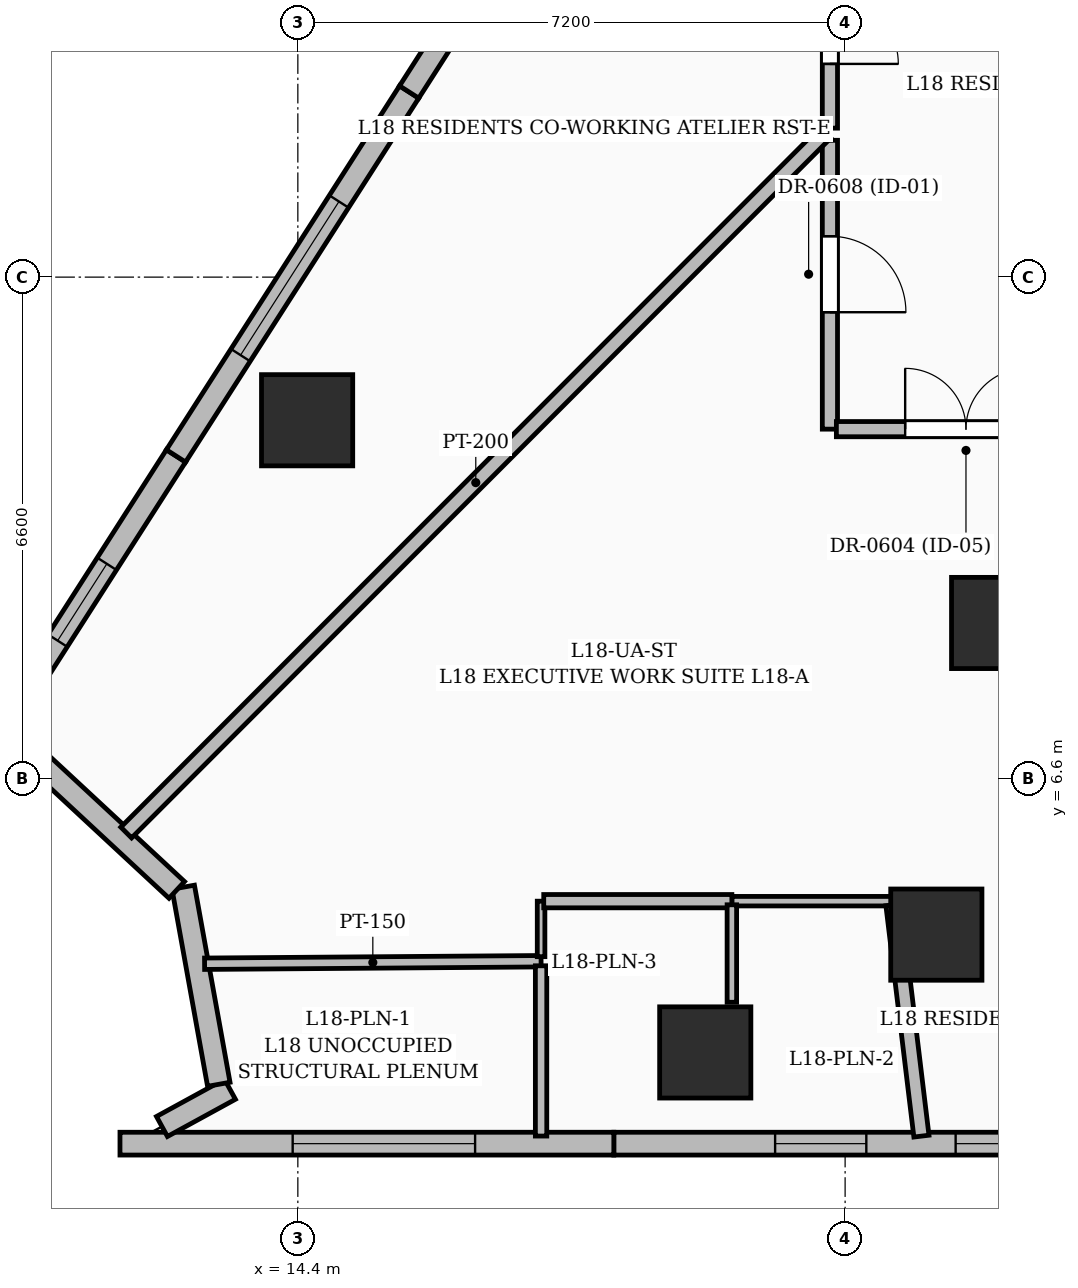
"""IFC4 building model, lengths in metres.
Left out: names, types, materials, properties, quantities, classifications, styles, units other than length and angle.
Written with IfcOpenShell. Run it as: python <this file> out.ifc"""

import sys

from ifc_helpers import new_model, si_unit, direction, frame, frame_2d, origin, origin_2d, place, context, subcontext, project, spatial, rectangle, extrude, element, fill, save


model = new_model("IFC4")
c1 = context("Model", 3, precision=1e-05, world=origin(), true_north=direction((0.0, 1.0)))
c2 = subcontext(c1, "Body", "Model", "MODEL_VIEW")
j1 = project(units=[si_unit("LENGTHUNIT", "METRE"), si_unit("PLANEANGLEUNIT", "RADIAN")], contexts=[c1])
p1 = place(None, origin())
s1 = spatial("IfcSite", under=j1, at=p1, CompositionType="ELEMENT")
p2 = place(p1, origin())
s2 = spatial("IfcBuilding", under=s1, at=p2, CompositionType="ELEMENT")
p3 = place(p2, frame((0.0, 0.0, 75.0)))
s3 = spatial("IfcBuildingStorey", under=s2, at=p3, CompositionType="ELEMENT", Elevation=75.0)
for number, where, z_axis, x_axis in (
    (1, (22.8, 4.55, 0.0), (0.0, 0.0, 1.0), (1.0, 0.0, 0.0)),
    (2, (23.6, 8.65, 0.0), (0.0, 0.0, 1.0), (1.0, 0.0, 0.0)),
    (3, (19.76, 3.0, 0.0), (0.0, 0.0, 1.0), (1.0, 0.0, 0.0)),
    (4, (14.522, 11.317, 0.0), (0.0, 0.0, 1.0), (1.0, 0.0, 0.0)),
):
    element("IfcColumn", number, at=place(p3, frame(where, z_axis=z_axis, x_axis=x_axis)), inside=s3, PredefinedType="COLUMN", context=c2, shape_type="SweptSolid", body=[
        extrude(rectangle(XDim=1.2, YDim=1.2, at=origin_2d()), origin(), (0.0, 0.0, 1.0), 3.6),
    ])
p4 = place(p3, frame((25.054, 1.8, 0.0), z_axis=(0.0, 0.0, 1.0), x_axis=(-1.0, 0.0, 0.0)))
e5 = element("IfcWall", 5, at=p4, inside=s3, PredefinedType="SOLIDWALL", context=c2, shape_type="SweptSolid", body=[
    extrude(rectangle(XDim=6.497, YDim=0.3, at=frame_2d((3.249, 0.0))), origin(), (0.0, 0.0, 1.0), 3.35),
])
p5 = place(p4, frame((3.175, 0.0, 0.8)))
e6 = element("IfcOpeningElement", 6, at=p5, cuts=e5, PredefinedType="OPENING", context=c2, shape_type="SweptSolid", body=[
    extrude(rectangle(XDim=1.2, YDim=1.8, at=frame_2d((0.6, 0.9))), frame((0.0, 0.16, 0.0), z_axis=(0.0, -1.0, 0.0), x_axis=(1.0, 0.0, 0.0)), (0.0, 0.0, 1.0), 0.32),
])
p6 = place(p4, frame((0.8, 0.0, 0.8)))
e7 = element("IfcOpeningElement", 7, at=p6, cuts=e5, PredefinedType="OPENING", context=c2, shape_type="SweptSolid", body=[
    extrude(rectangle(XDim=1.2, YDim=1.8, at=frame_2d((0.6, 0.9))), frame((0.0, 0.16, 0.0), z_axis=(0.0, -1.0, 0.0), x_axis=(1.0, 0.0, 0.0)), (0.0, 0.0, 1.0), 0.32),
])
p7 = place(p3, frame((18.557, 1.8, 0.0), z_axis=(0.0, 0.0, 1.0), x_axis=(-1.0, 0.0, 0.0)))
e8 = element("IfcWall", 8, at=p7, inside=s3, PredefinedType="SOLIDWALL", context=c2, shape_type="SweptSolid", body=[
    extrude(rectangle(XDim=6.497, YDim=0.3, at=frame_2d((3.249, 0.0))), origin(), (0.0, 0.0, 1.0), 3.35),
])
p8 = place(p7, frame((1.825, 0.0, 0.6)))
e9 = element("IfcOpeningElement", 9, at=p8, cuts=e8, PredefinedType="OPENING", context=c2, shape_type="SweptSolid", body=[
    extrude(rectangle(XDim=2.4, YDim=2.1, at=frame_2d((1.2, 1.05))), frame((0.0, 0.16, 0.0), z_axis=(0.0, -1.0, 0.0), x_axis=(1.0, 0.0, 0.0)), (0.0, 0.0, 1.0), 0.32),
])
p9 = place(p3, frame((12.612, 2.026, 0.0), z_axis=(0.0, 0.0, 1.0), x_axis=(0.877245120991, 0.480042704036, 0.0)))
e10 = element("IfcWall", 10, at=p9, inside=s3, PredefinedType="SOLIDWALL", context=c2, shape_type="SweptSolid", body=[
    extrude(rectangle(XDim=1.02, YDim=0.3, at=frame_2d((0.51, 0.0))), origin(), (0.0, 0.0, 1.0), 3.35),
])
p10 = place(p3, frame((13.36, 2.581, 0.0), z_axis=(0.0, 0.0, 1.0), x_axis=(-0.177621463404, 0.984098885142, 0.0)))
e11 = element("IfcWall", 11, at=p10, inside=s3, PredefinedType="SOLIDWALL", context=c2, shape_type="SweptSolid", body=[
    extrude(rectangle(XDim=2.635, YDim=0.3, at=frame_2d((1.317, 0.0))), origin(), (0.0, 0.0, 1.0), 3.35),
])
p11 = place(p3, frame((12.807, 5.138, 0.0), z_axis=(0.0, 0.0, 1.0), x_axis=(-0.732670686937, 0.680583326642, 0.0)))
e12 = element("IfcWall", 12, at=p11, inside=s3, PredefinedType="SOLIDWALL", context=c2, shape_type="SweptSolid", body=[
    extrude(rectangle(XDim=2.62, YDim=0.3, at=frame_2d((1.31, 0.0))), origin(), (0.0, 0.0, 1.0), 3.35),
])
p12 = place(p3, frame((10.061, 6.578, 0.0), z_axis=(0.0, 0.0, 1.0), x_axis=(0.539464859434, 0.842008114828, 0.0)))
e13 = element("IfcWall", 13, at=p12, inside=s3, PredefinedType="SOLIDWALL", context=c2, shape_type="SweptSolid", body=[
    extrude(rectangle(XDim=5.071, YDim=0.3, at=frame_2d((2.536, 0.0))), origin(), (0.0, 0.0, 1.0), 3.35),
])
p13 = place(p12, frame((2.185, 0.0, 0.8)))
e14 = element("IfcOpeningElement", 14, at=p13, cuts=e13, PredefinedType="OPENING", context=c2, shape_type="SweptSolid", body=[
    extrude(rectangle(XDim=1.2, YDim=1.8, at=frame_2d((0.6, 0.9))), frame((0.0, 0.16, 0.0), z_axis=(0.0, -1.0, 0.0), x_axis=(1.0, 0.0, 0.0)), (0.0, 0.0, 1.0), 0.32),
])
p14 = place(p3, frame((12.797, 10.848, 0.0), z_axis=(0.0, 0.0, 1.0), x_axis=(0.539467898562, 0.842006167686, 0.0)))
e15 = element("IfcWall", 15, at=p14, inside=s3, PredefinedType="SOLIDWALL", context=c2, shape_type="SweptSolid", body=[
    extrude(rectangle(XDim=5.686, YDim=0.3, at=frame_2d((2.843, 0.0))), origin(), (0.0, 0.0, 1.0), 3.35),
])
p15 = place(p14, frame((1.575, 0.0, 0.6)))
e16 = element("IfcOpeningElement", 16, at=p15, cuts=e15, PredefinedType="OPENING", context=c2, shape_type="SweptSolid", body=[
    extrude(rectangle(XDim=2.4, YDim=2.1, at=frame_2d((1.2, 1.05))), frame((0.0, 0.16, 0.0), z_axis=(0.0, -1.0, 0.0), x_axis=(1.0, 0.0, 0.0)), (0.0, 0.0, 1.0), 0.32),
])
p16 = place(p3, frame((15.864, 15.635, 0.0), z_axis=(0.0, 0.0, 1.0), x_axis=(0.53944798429, 0.842018926299, 0.0)))
e17 = element("IfcWall", 17, at=p16, inside=s3, PredefinedType="SOLIDWALL", context=c2, shape_type="SweptSolid", body=[
    extrude(rectangle(XDim=5.411, YDim=0.3, at=frame_2d((2.706, 0.0))), origin(), (0.0, 0.0, 1.0), 3.35),
])
p17 = place(p16, frame((1.725, 0.0, 0.55)))
e18 = element("IfcOpeningElement", 18, at=p17, cuts=e17, PredefinedType="OPENING", context=c2, shape_type="SweptSolid", body=[
    extrude(rectangle(XDim=2.1, YDim=2.4, at=frame_2d((1.05, 1.2))), frame((0.0, 0.16, 0.0), z_axis=(0.0, -1.0, 0.0), x_axis=(1.0, 0.0, 0.0)), (0.0, 0.0, 1.0), 0.32),
])
p18 = place(p3, frame((21.4, 15.0, 0.0), z_axis=(0.0, 0.0, 1.0), x_axis=(0.0, -1.0, 0.0)))
e19 = element("IfcWall", 19, at=p18, inside=s3, PredefinedType="PARTITIONING", context=c2, shape_type="SweptSolid", body=[
    extrude(rectangle(XDim=3.8, YDim=0.2, at=frame_2d((1.9, 0.0))), origin(), (0.0, 0.0, 1.0), 2.911),
])
p19 = place(p18, frame((1.262, 0.0, 0.0)))
e20 = element("IfcOpeningElement", 20, at=p19, cuts=e19, PredefinedType="OPENING", context=c2, shape_type="SweptSolid", body=[
    extrude(rectangle(XDim=1.0, YDim=2.2, at=frame_2d((0.5, 1.1))), frame((0.0, 0.11, 0.0), z_axis=(0.0, -1.0, 0.0), x_axis=(1.0, 0.0, 0.0)), (0.0, 0.0, 1.0), 0.22),
])
p20 = place(p3, frame((21.485, 11.2, 0.0), z_axis=(0.0, 0.0, 1.0), x_axis=(1.0, 0.0, 0.0)))
e21 = element("IfcWall", 21, at=p20, inside=s3, PredefinedType="PARTITIONING", context=c2, shape_type="SweptSolid", body=[
    extrude(rectangle(XDim=3.384, YDim=0.2, at=frame_2d((1.692, 0.0))), origin(), (0.0, 0.0, 1.0), 3.35),
])
p21 = place(p20, frame((0.905, 0.0, 0.0)))
e22 = element("IfcOpeningElement", 22, at=p21, cuts=e21, PredefinedType="OPENING", context=c2, shape_type="SweptSolid", body=[
    extrude(rectangle(XDim=1.6, YDim=2.3, at=frame_2d((0.8, 1.15))), frame((0.0, 0.11, 0.0), z_axis=(0.0, -1.0, 0.0), x_axis=(1.0, 0.0, 0.0)), (0.0, 0.0, 1.0), 0.22),
])
p22 = place(p3, frame((21.4, 17.75, 0.0), z_axis=(0.0, 0.0, 1.0), x_axis=(0.0, -1.0, 0.0)))
e23 = element("IfcWall", 23, at=p22, inside=s3, PredefinedType="PARTITIONING", context=c2, shape_type="SweptSolid", body=[
    extrude(rectangle(XDim=2.59, YDim=0.2, at=frame_2d((1.295, 0.0))), origin(), (0.0, 0.0, 1.0), 2.911),
])
p23 = place(p22, frame((0.845, 0.0, 0.0)))
e24 = element("IfcOpeningElement", 24, at=p23, cuts=e23, PredefinedType="OPENING", context=c2, shape_type="SweptSolid", body=[
    extrude(rectangle(XDim=0.9, YDim=2.1, at=frame_2d((0.45, 1.05))), frame((0.0, 0.11, 0.0), z_axis=(0.0, -1.0, 0.0), x_axis=(1.0, 0.0, 0.0)), (0.0, 0.0, 1.0), 0.22),
])
p24 = place(p3, frame((13.173, 4.167, 0.0), z_axis=(0.0, 0.0, 1.0), x_axis=(0.999972287215, 0.007444783476, 0.0)))
e25 = element("IfcWall", 25, at=p24, inside=s3, PredefinedType="PARTITIONING", context=c2, shape_type="SweptSolid", body=[
    extrude(rectangle(XDim=4.427, YDim=0.15, at=frame_2d((2.214, 0.0))), origin(), (0.0, 0.0, 1.0), 3.35),
])
p25 = place(p3, frame((20.11, 4.99, 0.0), z_axis=(0.0, 0.0, 1.0), x_axis=(1.0, 0.0, 0.0)))
e26 = element("IfcWall", 26, at=p25, inside=s3, PredefinedType="PARTITIONING", context=c2, shape_type="SweptSolid", body=[
    extrude(rectangle(XDim=2.12, YDim=0.125, at=frame_2d((1.06, 0.0))), origin(), (0.0, 0.0, 1.0), 2.911),
])
p26 = place(p3, frame((17.6, 4.26, 0.0), z_axis=(0.0, 0.0, 1.0), x_axis=(0.0, 1.0, 0.0)))
e27 = element("IfcWall", 27, at=p26, inside=s3, PredefinedType="PARTITIONING", context=c2, shape_type="SweptSolid", body=[
    extrude(rectangle(XDim=0.73, YDim=0.1, at=frame_2d((0.365, 0.0))), origin(), (0.0, 0.0, 1.0), 3.35),
])
p27 = place(p3, frame((17.635, 4.99, 0.0), z_axis=(0.0, 0.0, 1.0), x_axis=(1.0, 0.0, 0.0)))
e28 = element("IfcWall", 28, at=p27, inside=s3, PredefinedType="PARTITIONING", context=c2, shape_type="SweptSolid", body=[
    extrude(rectangle(XDim=2.475, YDim=0.175, at=frame_2d((1.238, 0.0))), origin(), (0.0, 0.0, 1.0), 2.37),
])
p28 = place(p3, frame((21.34, 15.1, 0.0), z_axis=(0.0, 0.0, 1.0), x_axis=(-0.706759638276, -0.707453753756, 0.0)))
e29 = element("IfcWall", 29, at=p28, inside=s3, PredefinedType="PARTITIONING", context=c2, shape_type="SweptSolid", body=[
    extrude(rectangle(XDim=13.014, YDim=0.2, at=frame_2d((6.507, 0.0))), origin(), (0.0, 0.0, 1.0), 2.345),
])
p29 = place(p3, frame((17.6, 1.9, 0.0), z_axis=(0.0, 0.0, 1.0), x_axis=(0.0, 1.0, 0.0)))
e30 = element("IfcWall", 30, at=p29, inside=s3, PredefinedType="PARTITIONING", context=c2, shape_type="SweptSolid", body=[
    extrude(rectangle(XDim=2.24, YDim=0.15, at=frame_2d((1.12, 0.0))), origin(), (0.0, 0.0, 1.0), 3.35),
])
p30 = place(p3, frame((20.11, 4.942, 0.0), z_axis=(0.0, 0.0, 1.0), x_axis=(0.0, -1.0, 0.0)))
e31 = element("IfcWall", 31, at=p30, inside=s3, PredefinedType="PARTITIONING", context=c2, shape_type="SweptSolid", body=[
    extrude(rectangle(XDim=1.282, YDim=0.125, at=frame_2d((0.641, 0.0))), origin(), (0.0, 0.0, 1.0), 2.911),
])
p31 = place(p3, frame((22.604, 1.899, 0.0), z_axis=(0.0, 0.0, 1.0), x_axis=(-0.120074545748, 0.992764878238, 0.0)))
e32 = element("IfcWall", 32, at=p31, inside=s3, PredefinedType="PARTITIONING", context=c2, shape_type="SweptSolid", body=[
    extrude(rectangle(XDim=3.066, YDim=0.2, at=frame_2d((1.533, 0.0))), origin(), (0.0, 0.0, 1.0), 2.345),
])
p32 = place(p5, origin())
e33 = element("IfcWindow", 33, at=p32, inside=s3, PartitioningType="SINGLE_PANEL", PredefinedType="WINDOW", context=c2, shape_type="SweptSolid", body=[
    extrude(rectangle(XDim=1.2, YDim=1.8, at=frame_2d((0.6, 0.9))), frame((0.0, 0.03, 0.0), z_axis=(0.0, -1.0, 0.0), x_axis=(1.0, 0.0, 0.0)), (0.0, 0.0, 1.0), 0.06),
])
fill(e6, e33)
p33 = place(p6, origin())
e34 = element("IfcWindow", 34, at=p33, inside=s3, PartitioningType="SINGLE_PANEL", PredefinedType="WINDOW", context=c2, shape_type="SweptSolid", body=[
    extrude(rectangle(XDim=1.2, YDim=1.8, at=frame_2d((0.6, 0.9))), frame((0.0, 0.03, 0.0), z_axis=(0.0, -1.0, 0.0), x_axis=(1.0, 0.0, 0.0)), (0.0, 0.0, 1.0), 0.06),
])
fill(e7, e34)
p34 = place(p8, origin())
e35 = element("IfcWindow", 35, at=p34, inside=s3, PartitioningType="SINGLE_PANEL", PredefinedType="WINDOW", context=c2, shape_type="SweptSolid", body=[
    extrude(rectangle(XDim=2.4, YDim=2.1, at=frame_2d((1.2, 1.05))), frame((0.0, 0.03, 0.0), z_axis=(0.0, -1.0, 0.0), x_axis=(1.0, 0.0, 0.0)), (0.0, 0.0, 1.0), 0.06),
])
fill(e9, e35)
p35 = place(p13, origin())
e36 = element("IfcWindow", 36, at=p35, inside=s3, PartitioningType="SINGLE_PANEL", PredefinedType="WINDOW", context=c2, shape_type="SweptSolid", body=[
    extrude(rectangle(XDim=1.2, YDim=1.8, at=frame_2d((0.6, 0.9))), frame((0.0, 0.03, 0.0), z_axis=(0.0, -1.0, 0.0), x_axis=(1.0, 0.0, 0.0)), (0.0, 0.0, 1.0), 0.06),
])
fill(e14, e36)
p36 = place(p15, origin())
e37 = element("IfcWindow", 37, at=p36, inside=s3, PartitioningType="SINGLE_PANEL", PredefinedType="WINDOW", context=c2, shape_type="SweptSolid", body=[
    extrude(rectangle(XDim=2.4, YDim=2.1, at=frame_2d((1.2, 1.05))), frame((0.0, 0.03, 0.0), z_axis=(0.0, -1.0, 0.0), x_axis=(1.0, 0.0, 0.0)), (0.0, 0.0, 1.0), 0.06),
])
fill(e16, e37)
p37 = place(p21, origin())
e38 = element("IfcDoor", 38, at=p37, inside=s3, OperationType="DOUBLE_DOOR_SINGLE_SWING", PredefinedType="DOOR", context=c2, shape_type="SweptSolid", body=[
    extrude(rectangle(XDim=1.6, YDim=2.3, at=frame_2d((0.8, 1.15))), frame((0.0, 0.025, 0.0), z_axis=(0.0, -1.0, 0.0), x_axis=(1.0, 0.0, 0.0)), (0.0, 0.0, 1.0), 0.05),
])
fill(e22, e38)
p38 = place(p23, origin())
e39 = element("IfcDoor", 39, at=p38, inside=s3, OperationType="SINGLE_SWING_RIGHT", PredefinedType="DOOR", context=c2, shape_type="SweptSolid", body=[
    extrude(rectangle(XDim=0.9, YDim=2.1, at=frame_2d((0.45, 1.05))), frame((0.0, 0.025, 0.0), z_axis=(0.0, -1.0, 0.0), x_axis=(1.0, 0.0, 0.0)), (0.0, 0.0, 1.0), 0.05),
])
fill(e24, e39)
p39 = place(p19, origin())
e40 = element("IfcDoor", 40, at=p39, inside=s3, OperationType="SINGLE_SWING_RIGHT", PredefinedType="DOOR", context=c2, shape_type="SweptSolid", body=[
    extrude(rectangle(XDim=1.0, YDim=2.2, at=frame_2d((0.5, 1.1))), frame((0.0, 0.025, 0.0), z_axis=(0.0, -1.0, 0.0), x_axis=(1.0, 0.0, 0.0)), (0.0, 0.0, 1.0), 0.05),
])
fill(e20, e40)
save(model, sys.argv[1])
